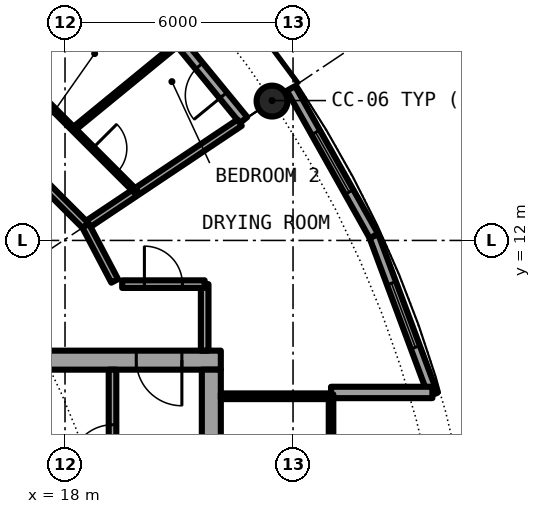
"""IFC4 building model, lengths in metres.
Left out: names, types, materials, properties, quantities, classifications, styles, units other than length and angle.
Written with IfcOpenShell. Run it as: python <this file> out.ifc"""

import sys

from ifc_helpers import new_model, si_unit, direction, frame, frame_2d, origin, origin_2d, place, context, subcontext, project, spatial, rectangle, hollow_circle, extrude, element, fill, save


model = new_model("IFC4")
c1 = context("Model", 3, precision=1e-05, world=origin(), true_north=direction((0.0, 1.0)))
c2 = subcontext(c1, "Body", "Model", "MODEL_VIEW")
j1 = project(units=[si_unit("LENGTHUNIT", "METRE"), si_unit("PLANEANGLEUNIT", "RADIAN")], contexts=[c1])
p1 = place(None, origin())
s1 = spatial("IfcSite", under=j1, at=p1, CompositionType="ELEMENT")
p2 = place(p1, origin())
s2 = spatial("IfcBuilding", under=s1, at=p2, CompositionType="ELEMENT")
p3 = place(p2, frame((0.0, 0.0, 170.75)))
s3 = spatial("IfcBuildingStorey", under=s2, at=p3, CompositionType="ELEMENT", Elevation=170.75)
p4 = place(p3, frame((23.448, 15.667, 0.0), z_axis=(0.0, 0.0, 1.0), x_axis=(1.0, 0.0, 0.0)))
e1 = element("IfcColumn", 1, at=p4, inside=s3, PredefinedType="COLUMN", context=c2, shape_type="SweptSolid", body=[
    extrude(hollow_circle(Radius=0.406, WallThickness=0.04, at=origin_2d()), origin(), (0.0, 0.0, 1.0), 3.05),
])
p5 = place(p3, frame((22.699, 15.167, 0.0), z_axis=(0.0, 0.0, 1.0), x_axis=(-0.634382322723, 0.773019449054, 0.0)))
e2 = element("IfcWall", 2, at=p5, inside=s3, PredefinedType="SOLIDWALL", context=c2, shape_type="SweptSolid", body=[
    extrude(rectangle(XDim=5.352, YDim=0.25, at=frame_2d((2.676, 0.0))), origin(), (0.0, 0.0, 1.0), 2.7),
])
p6 = place(p5, frame((0.841, 0.0, 0.0)))
e3 = element("IfcOpeningElement", 3, at=p6, cuts=e2, PredefinedType="OPENING", context=c2, shape_type="SweptSolid", body=[
    extrude(rectangle(XDim=1.0, YDim=2.2, at=frame_2d((0.5, 1.1))), frame((0.0, 0.135, 0.0), z_axis=(0.0, -1.0, 0.0), x_axis=(1.0, 0.0, 0.0)), (0.0, 0.0, 1.0), 0.27),
])
p7 = place(p5, frame((3.111, 0.0, 0.3)))
e4 = element("IfcOpeningElement", 4, at=p7, cuts=e2, PredefinedType="OPENING", context=c2, shape_type="SweptSolid", body=[
    extrude(rectangle(XDim=1.8, YDim=2.1, at=frame_2d((0.9, 1.05))), frame((0.0, 0.135, 0.0), z_axis=(0.0, -1.0, 0.0), x_axis=(1.0, 0.0, 0.0)), (0.0, 0.0, 1.0), 0.27),
])
p8 = place(p3, frame((27.682, 7.945, 0.0), z_axis=(0.0, 0.0, 1.0), x_axis=(-0.349247811493, 0.937030397675, 0.0)))
e5 = element("IfcWall", 5, at=p8, inside=s3, PredefinedType="SOLIDWALL", context=c2, shape_type="SweptSolid", body=[
    extrude(rectangle(XDim=4.452, YDim=0.25, at=frame_2d((2.226, 0.0))), origin(), (0.0, 0.0, 1.0), 2.7),
])
p9 = place(p8, frame((1.327, 0.0, 0.3)))
e6 = element("IfcOpeningElement", 6, at=p9, cuts=e5, PredefinedType="OPENING", context=c2, shape_type="SweptSolid", body=[
    extrude(rectangle(XDim=1.8, YDim=2.1, at=frame_2d((0.9, 1.05))), frame((0.0, 0.135, 0.0), z_axis=(0.0, -1.0, 0.0), x_axis=(1.0, 0.0, 0.0)), (0.0, 0.0, 1.0), 0.27),
])
p10 = place(p3, frame((26.127, 12.117, 0.0), z_axis=(0.0, 0.0, 1.0), x_axis=(-0.489696356642, 0.871893042919, 0.0)))
e7 = element("IfcWall", 7, at=p10, inside=s3, PredefinedType="SOLIDWALL", context=c2, shape_type="SweptSolid", body=[
    extrude(rectangle(XDim=4.454, YDim=0.25, at=frame_2d((2.227, 0.0))), origin(), (0.0, 0.0, 1.0), 2.7),
])
p11 = place(p10, frame((1.327, 0.0, 0.3)))
e8 = element("IfcOpeningElement", 8, at=p11, cuts=e7, PredefinedType="OPENING", context=c2, shape_type="SweptSolid", body=[
    extrude(rectangle(XDim=1.8, YDim=2.1, at=frame_2d((0.9, 1.05))), frame((0.0, 0.135, 0.0), z_axis=(0.0, -1.0, 0.0), x_axis=(1.0, 0.0, 0.0)), (0.0, 0.0, 1.0), 0.27),
])
p12 = place(p3, frame((25.0, 8.0, 0.0), z_axis=(0.0, 0.0, 1.0), x_axis=(1.0, 0.0, 0.0)))
e9 = element("IfcWall", 9, at=p12, inside=s3, PredefinedType="SOLIDWALL", context=c2, shape_type="SweptSolid", body=[
    extrude(rectangle(XDim=2.667, YDim=0.3, at=frame_2d((1.333, 0.0))), origin(), (0.0, 0.0, 1.0), 2.7),
])
p13 = place(p3, frame((22.1, 8.85, 0.0), z_axis=(0.0, 0.0, 1.0), x_axis=(-1.0, 0.0, 0.0)))
e10 = element("IfcWall", 10, at=p13, inside=s3, PredefinedType="SHEAR", context=c2, shape_type="SweptSolid", body=[
    extrude(rectangle(XDim=13.6, YDim=0.5, at=frame_2d((6.8, 0.0))), origin(), (0.0, 0.0, 1.0), 3.05),
])
p14 = place(p13, frame((1.025, 0.0, 0.0)))
e11 = element("IfcOpeningElement", 11, at=p14, cuts=e10, PredefinedType="OPENING", context=c2, shape_type="SweptSolid", body=[
    extrude(rectangle(XDim=1.2, YDim=2.3, at=frame_2d((0.6, 1.15))), frame((0.0, 0.26, 0.0), z_axis=(0.0, -1.0, 0.0), x_axis=(1.0, 0.0, 0.0)), (0.0, 0.0, 1.0), 0.52),
])
p15 = place(p3, frame((21.85, 8.6, 0.0), z_axis=(0.0, 0.0, 1.0), x_axis=(0.0, -1.0, 0.0)))
e12 = element("IfcWall", 12, at=p15, inside=s3, PredefinedType="SHEAR", context=c2, shape_type="SweptSolid", body=[
    extrude(rectangle(XDim=17.2, YDim=0.5, at=frame_2d((8.6, 0.0))), origin(), (0.0, 0.0, 1.0), 3.05),
])
p16 = place(p15, frame((7.7, 0.0, 0.0)))
e13 = element("IfcOpeningElement", 13, at=p16, cuts=e12, PredefinedType="OPENING", context=c2, shape_type="SweptSolid", body=[
    extrude(rectangle(XDim=1.8, YDim=2.3, at=frame_2d((0.9, 1.15))), frame((0.0, 0.26, 0.0), z_axis=(0.0, -1.0, 0.0), x_axis=(1.0, 0.0, 0.0)), (0.0, 0.0, 1.0), 0.52),
])
p17 = place(p3, frame((19.25, 1.575, 0.0), z_axis=(0.0, 0.0, 1.0), x_axis=(0.0, 1.0, 0.0)))
e14 = element("IfcWall", 14, at=p17, inside=s3, PredefinedType="SOLIDWALL", context=c2, shape_type="SweptSolid", body=[
    extrude(rectangle(XDim=7.025, YDim=0.2, at=frame_2d((3.513, 0.0))), origin(), (0.0, 0.0, 1.0), 2.7),
])
p18 = place(p17, frame((4.475, 0.0, 0.0)))
e15 = element("IfcOpeningElement", 15, at=p18, cuts=e14, PredefinedType="OPENING", context=c2, shape_type="SweptSolid", body=[
    extrude(rectangle(XDim=1.1, YDim=2.3, at=frame_2d((0.55, 1.15))), frame((0.0, 0.11, 0.0), z_axis=(0.0, -1.0, 0.0), x_axis=(1.0, 0.0, 0.0)), (0.0, 0.0, 1.0), 0.22),
])
p19 = place(p3, frame((22.1, 7.9, 0.0), z_axis=(0.0, 0.0, 1.0), x_axis=(1.0, 0.0, 0.0)))
e16 = element("IfcWall", 16, at=p19, inside=s3, PredefinedType="PARTITIONING", context=c2, shape_type="SweptSolid", body=[
    extrude(rectangle(XDim=2.84, YDim=0.15, at=frame_2d((1.42, 0.0))), origin(), (0.0, 0.0, 1.0), 2.7),
])
p20 = place(p3, frame((25.0, -7.95, 0.0), z_axis=(0.0, 0.0, 1.0), x_axis=(0.0, 1.0, 0.0)))
e17 = element("IfcWall", 17, at=p20, inside=s3, PredefinedType="PARTITIONING", context=c2, shape_type="SweptSolid", body=[
    extrude(rectangle(XDim=15.9, YDim=0.12, at=frame_2d((7.95, 0.0))), origin(), (0.0, 0.0, 1.0), 2.7),
])
p21 = place(p20, frame((0.95, 0.0, 0.1)))
e18 = element("IfcOpeningElement", 18, at=p21, cuts=e17, PredefinedType="OPENING", context=c2, shape_type="SweptSolid", body=[
    extrude(rectangle(XDim=14.0, YDim=2.35, at=frame_2d((7.0, 1.175))), frame((0.0, 0.07, 0.0), z_axis=(0.0, -1.0, 0.0), x_axis=(1.0, 0.0, 0.0)), (0.0, 0.0, 1.0), 0.14),
])
p22 = place(p3, frame((21.675, 9.1, 0.0), z_axis=(0.0, 0.0, 1.0), x_axis=(0.0, 1.0, 0.0)))
e19 = element("IfcWall", 19, at=p22, inside=s3, PredefinedType="PARTITIONING", context=c2, shape_type="SweptSolid", body=[
    extrude(rectangle(XDim=1.75, YDim=0.2, at=frame_2d((0.875, 0.0))), origin(), (0.0, 0.0, 1.0), 2.7),
])
p23 = place(p3, frame((16.575, 16.575, 0.0), z_axis=(0.0, 0.0, 1.0), x_axis=(0.707106781187, 0.707106781187, 0.0)))
e20 = element("IfcWall", 20, at=p23, inside=s3, PredefinedType="PARTITIONING", context=c2, shape_type="SweptSolid", body=[
    extrude(rectangle(XDim=3.735, YDim=0.1, at=frame_2d((1.868, 0.0))), origin(), (0.0, 0.0, 1.0), 2.7),
])
p24 = place(p23, frame((1.417, 0.0, 0.0)))
e21 = element("IfcOpeningElement", 21, at=p24, cuts=e20, PredefinedType="OPENING", context=c2, shape_type="SweptSolid", body=[
    extrude(rectangle(XDim=0.9, YDim=2.3, at=frame_2d((0.45, 1.15))), frame((0.0, 0.06, 0.0), z_axis=(0.0, -1.0, 0.0), x_axis=(1.0, 0.0, 0.0)), (0.0, 0.0, 1.0), 0.12),
])
p25 = place(p3, frame((18.224, 14.927, 0.0), z_axis=(0.0, 0.0, 1.0), x_axis=(0.773548271597, 0.633737383709, 0.0)))
e22 = element("IfcWall", 22, at=p25, inside=s3, PredefinedType="PARTITIONING", context=c2, shape_type="SweptSolid", body=[
    extrude(rectangle(XDim=3.618, YDim=0.1, at=frame_2d((1.809, 0.0))), origin(), (0.0, 0.0, 1.0), 2.7),
])
p26 = place(p3, frame((18.542, 12.389, 0.0), z_axis=(0.0, 0.0, 1.0), x_axis=(0.831387096605, 0.55569370664, 0.0)))
e23 = element("IfcWall", 23, at=p26, inside=s3, PredefinedType="PARTITIONING", context=c2, shape_type="SweptSolid", body=[
    extrude(rectangle(XDim=4.875, YDim=0.2, at=frame_2d((2.438, 0.0))), origin(), (0.0, 0.0, 1.0), 2.7),
])
p27 = place(p3, frame((19.504, 10.85, 0.0), z_axis=(0.0, 0.0, 1.0), x_axis=(1.0, 0.0, 0.0)))
e24 = element("IfcWall", 24, at=p27, inside=s3, PredefinedType="PARTITIONING", context=c2, shape_type="SweptSolid", body=[
    extrude(rectangle(XDim=2.171, YDim=0.2, at=frame_2d((1.085, 0.0))), origin(), (0.0, 0.0, 1.0), 2.7),
])
p28 = place(p27, frame((0.585, 0.0, 0.0)))
e25 = element("IfcOpeningElement", 25, at=p28, cuts=e24, PredefinedType="OPENING", context=c2, shape_type="SweptSolid", body=[
    extrude(rectangle(XDim=1.0, YDim=2.3, at=frame_2d((0.5, 1.15))), frame((0.0, 0.11, 0.0), z_axis=(0.0, -1.0, 0.0), x_axis=(1.0, 0.0, 0.0)), (0.0, 0.0, 1.0), 0.22),
])
p29 = place(p3, frame((12.389, 18.542, 0.0), z_axis=(0.0, 0.0, 1.0), x_axis=(0.707106781187, -0.707106781187, 0.0)))
e26 = element("IfcWall", 26, at=p29, inside=s3, PredefinedType="PARTITIONING", context=c2, shape_type="SweptSolid", body=[
    extrude(rectangle(XDim=8.702, YDim=0.2, at=frame_2d((4.351, 0.0))), origin(), (0.0, 0.0, 1.0), 2.7),
])
p30 = place(p29, frame((4.938, 0.0, 0.0)))
e27 = element("IfcOpeningElement", 27, at=p30, cuts=e26, PredefinedType="OPENING", context=c2, shape_type="SweptSolid", body=[
    extrude(rectangle(XDim=1.0, YDim=2.3, at=frame_2d((0.5, 1.15))), frame((0.0, 0.11, 0.0), z_axis=(0.0, -1.0, 0.0), x_axis=(1.0, 0.0, 0.0)), (0.0, 0.0, 1.0), 0.22),
])
p31 = place(p3, frame((18.542, 12.389, 0.0), z_axis=(0.0, 0.0, 1.0), x_axis=(0.465605550524, -0.884992356646, 0.0)))
e28 = element("IfcWall", 28, at=p31, inside=s3, PredefinedType="PARTITIONING", context=c2, shape_type="SweptSolid", body=[
    extrude(rectangle(XDim=1.643, YDim=0.2, at=frame_2d((0.821, 0.0))), origin(), (0.0, 0.0, 1.0), 2.7),
])
p32 = place(p3, frame((16.575, 16.575, 0.0), z_axis=(0.0, 0.0, 1.0), x_axis=(0.707132961115, -0.707080600289, 0.0)))
e29 = element("IfcWall", 29, at=p32, inside=s3, PredefinedType="PARTITIONING", context=c2, shape_type="SweptSolid", body=[
    extrude(rectangle(XDim=4.663, YDim=0.1, at=frame_2d((2.331, 0.0))), origin(), (0.0, 0.0, 1.0), 2.7),
])
p33 = place(p32, frame((3.043, 0.0, 0.0)))
e30 = element("IfcOpeningElement", 30, at=p33, cuts=e29, PredefinedType="OPENING", context=c2, shape_type="SweptSolid", body=[
    extrude(rectangle(XDim=0.9, YDim=2.3, at=frame_2d((0.45, 1.15))), frame((0.0, 0.06, 0.0), z_axis=(0.0, -1.0, 0.0), x_axis=(1.0, 0.0, 0.0)), (0.0, 0.0, 1.0), 0.12),
])
p34 = place(p6, origin())
e31 = element("IfcDoor", 31, at=p34, inside=s3, OperationType="SINGLE_SWING_LEFT", PredefinedType="DOOR", context=c2, shape_type="SweptSolid", body=[
    extrude(rectangle(XDim=1.0, YDim=2.2, at=frame_2d((0.5, 1.1))), frame((0.0, 0.025, 0.0), z_axis=(0.0, -1.0, 0.0), x_axis=(1.0, 0.0, 0.0)), (0.0, 0.0, 1.0), 0.05),
])
fill(e3, e31)
p35 = place(p9, origin())
e32 = element("IfcWindow", 32, at=p35, inside=s3, PartitioningType="SINGLE_PANEL", PredefinedType="WINDOW", context=c2, shape_type="SweptSolid", body=[
    extrude(rectangle(XDim=1.8, YDim=2.1, at=frame_2d((0.9, 1.05))), frame((0.0, 0.03, 0.0), z_axis=(0.0, -1.0, 0.0), x_axis=(1.0, 0.0, 0.0)), (0.0, 0.0, 1.0), 0.06),
])
fill(e6, e32)
p36 = place(p11, origin())
e33 = element("IfcWindow", 33, at=p36, inside=s3, PartitioningType="SINGLE_PANEL", PredefinedType="WINDOW", context=c2, shape_type="SweptSolid", body=[
    extrude(rectangle(XDim=1.8, YDim=2.1, at=frame_2d((0.9, 1.05))), frame((0.0, 0.03, 0.0), z_axis=(0.0, -1.0, 0.0), x_axis=(1.0, 0.0, 0.0)), (0.0, 0.0, 1.0), 0.06),
])
fill(e8, e33)
p37 = place(p18, origin())
e34 = element("IfcDoor", 34, at=p37, inside=s3, OperationType="SINGLE_SWING_LEFT", PredefinedType="DOOR", context=c2, shape_type="SweptSolid", body=[
    extrude(rectangle(XDim=1.1, YDim=2.3, at=frame_2d((0.55, 1.15))), frame((0.0, 0.025, 0.0), z_axis=(0.0, -1.0, 0.0), x_axis=(1.0, 0.0, 0.0)), (0.0, 0.0, 1.0), 0.05),
])
fill(e15, e34)
p38 = place(p14, origin())
e35 = element("IfcDoor", 35, at=p38, inside=s3, OperationType="SINGLE_SWING_RIGHT", PredefinedType="DOOR", context=c2, shape_type="SweptSolid", body=[
    extrude(rectangle(XDim=1.2, YDim=2.3, at=frame_2d((0.6, 1.15))), frame((0.0, 0.025, 0.0), z_axis=(0.0, -1.0, 0.0), x_axis=(1.0, 0.0, 0.0)), (0.0, 0.0, 1.0), 0.05),
])
fill(e11, e35)
p39 = place(p21, origin())
e36 = element("IfcWindow", 36, at=p39, inside=s3, PartitioningType="SINGLE_PANEL", PredefinedType="WINDOW", context=c2, shape_type="SweptSolid", body=[
    extrude(rectangle(XDim=14.0, YDim=2.35, at=frame_2d((7.0, 1.175))), frame((0.0, 0.03, 0.0), z_axis=(0.0, -1.0, 0.0), x_axis=(1.0, 0.0, 0.0)), (0.0, 0.0, 1.0), 0.06),
])
fill(e18, e36)
p40 = place(p33, origin())
e37 = element("IfcDoor", 37, at=p40, inside=s3, OperationType="SINGLE_SWING_RIGHT", PredefinedType="DOOR", context=c2, shape_type="SweptSolid", body=[
    extrude(rectangle(XDim=0.9, YDim=2.3, at=frame_2d((0.45, 1.15))), frame((0.0, 0.025, 0.0), z_axis=(0.0, -1.0, 0.0), x_axis=(1.0, 0.0, 0.0)), (0.0, 0.0, 1.0), 0.05),
])
fill(e30, e37)
p41 = place(p28, origin())
e38 = element("IfcDoor", 38, at=p41, inside=s3, OperationType="SINGLE_SWING_LEFT", PredefinedType="DOOR", context=c2, shape_type="SweptSolid", body=[
    extrude(rectangle(XDim=1.0, YDim=2.3, at=frame_2d((0.5, 1.15))), frame((0.0, 0.025, 0.0), z_axis=(0.0, -1.0, 0.0), x_axis=(1.0, 0.0, 0.0)), (0.0, 0.0, 1.0), 0.05),
])
fill(e25, e38)
save(model, sys.argv[1])
